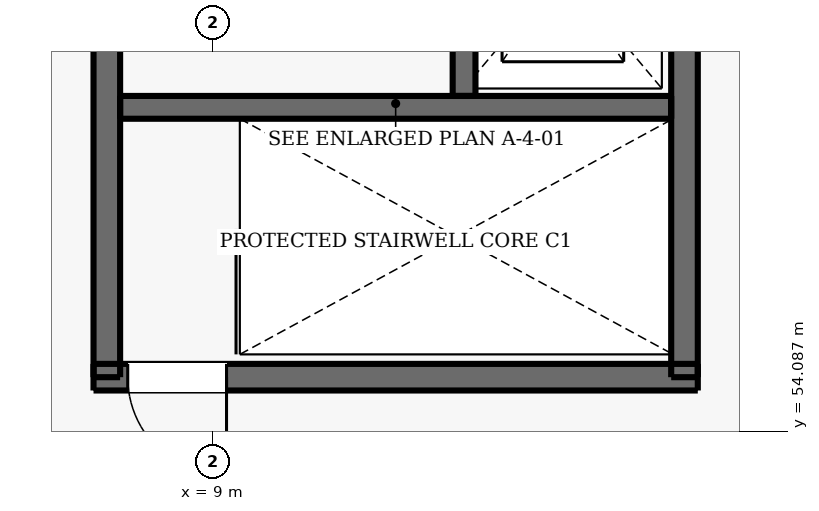
"""IFC4 building model, lengths in metres.
Left out: names, types, materials, properties, quantities, classifications, styles, units other than length and angle.
Written with IfcOpenShell. Run it as: python <this file> out.ifc"""

import sys

from ifc_helpers import new_model, si_unit, direction, frame, frame_2d, origin, place, context, subcontext, project, spatial, rectangle, extrude, element, fill, save


model = new_model("IFC4")
c1 = context("Model", 3, precision=1e-05, world=origin(), true_north=direction((0.0, 1.0)))
c2 = subcontext(c1, "Body", "Model", "MODEL_VIEW")
j1 = project(units=[si_unit("LENGTHUNIT", "METRE"), si_unit("PLANEANGLEUNIT", "RADIAN")], contexts=[c1])
p1 = place(None, origin())
s1 = spatial("IfcSite", under=j1, at=p1, CompositionType="ELEMENT")
p2 = place(p1, origin())
s2 = spatial("IfcBuilding", under=s1, at=p2, CompositionType="ELEMENT")
p3 = place(p2, frame((0.0, 0.0, 9.6)))
s3 = spatial("IfcBuildingStorey", under=s2, at=p3, CompositionType="ELEMENT", Elevation=9.6)
p4 = place(p3, frame((7.425, 54.8, 0.0), z_axis=(0.0, 0.0, 1.0), x_axis=(1.0, 0.0, 0.0)))
e1 = element("IfcWall", 1, at=p4, inside=s3, PredefinedType="SHEAR", context=c2, shape_type="SweptSolid", body=[
    extrude(rectangle(XDim=7.95, YDim=0.35, at=frame_2d((3.975, 0.0))), origin(), (0.0, 0.0, 1.0), 4.2),
])
p5 = place(p4, frame((0.45, 0.0, 0.0)))
e2 = element("IfcOpeningElement", 2, at=p5, cuts=e1, PredefinedType="OPENING", context=c2, shape_type="SweptSolid", body=[
    extrude(rectangle(XDim=1.3, YDim=2.15, at=frame_2d((0.65, 1.075))), frame((0.0, 0.185, 0.0), z_axis=(0.0, -1.0, 0.0), x_axis=(1.0, 0.0, 0.0)), (0.0, 0.0, 1.0), 0.37),
])
for number, where, z_axis, x_axis in (
    (3, (7.6, 54.8, 0.0), (0.0, 0.0, 1.0), (0.0, 1.0, 0.0)),
    (4, (15.2, 54.8, 0.0), (0.0, 0.0, 1.0), (0.0, 1.0, 0.0)),
):
    element("IfcWall", number, at=place(p3, frame(where, z_axis=z_axis, x_axis=x_axis)), inside=s3, PredefinedType="SHEAR", context=c2, shape_type="SweptSolid", body=[
        extrude(rectangle(XDim=7.2, YDim=0.35, at=frame_2d((3.6, 0.0))), origin(), (0.0, 0.0, 1.0), 4.2),
    ])
p6 = place(p3, frame((7.775, 58.35, 0.0), z_axis=(0.0, 0.0, 1.0), x_axis=(1.0, 0.0, 0.0)))
e5 = element("IfcWall", 5, at=p6, inside=s3, PredefinedType="SHEAR", context=c2, shape_type="SweptSolid", body=[
    extrude(rectangle(XDim=7.25, YDim=0.3, at=frame_2d((3.625, 0.0))), origin(), (0.0, 0.0, 1.0), 4.2),
])
p7 = place(p3, frame((12.3, 58.5, 0.0), z_axis=(0.0, 0.0, 1.0), x_axis=(0.0, 1.0, 0.0)))
e6 = element("IfcWall", 6, at=p7, inside=s3, PredefinedType="SHEAR", context=c2, shape_type="SweptSolid", body=[
    extrude(rectangle(XDim=3.325, YDim=0.3, at=frame_2d((1.663, 0.0))), origin(), (0.0, 0.0, 1.0), 4.2),
])
p8 = place(p7, frame((1.113, 0.0, 0.0)))
e7 = element("IfcOpeningElement", 7, at=p8, cuts=e6, PredefinedType="OPENING", context=c2, shape_type="SweptSolid", body=[
    extrude(rectangle(XDim=1.1, YDim=2.15, at=frame_2d((0.55, 1.075))), frame((0.0, 0.16, 0.0), z_axis=(0.0, -1.0, 0.0), x_axis=(1.0, 0.0, 0.0)), (0.0, 0.0, 1.0), 0.32),
])
p9 = place(p5, frame((1.3, 0.0, 0.0), z_axis=(0.0, 0.0, 1.0), x_axis=(-1.0, 0.0, 0.0)))
e8 = element("IfcDoor", 8, at=p9, inside=s3, OperationType="SINGLE_SWING_RIGHT", PredefinedType="DOOR", context=c2, shape_type="SweptSolid", body=[
    extrude(rectangle(XDim=1.3, YDim=2.15, at=frame_2d((0.65, 1.075))), frame((0.0, 0.025, 0.0), z_axis=(0.0, -1.0, 0.0), x_axis=(1.0, 0.0, 0.0)), (0.0, 0.0, 1.0), 0.05),
])
fill(e2, e8)
save(model, sys.argv[1])
